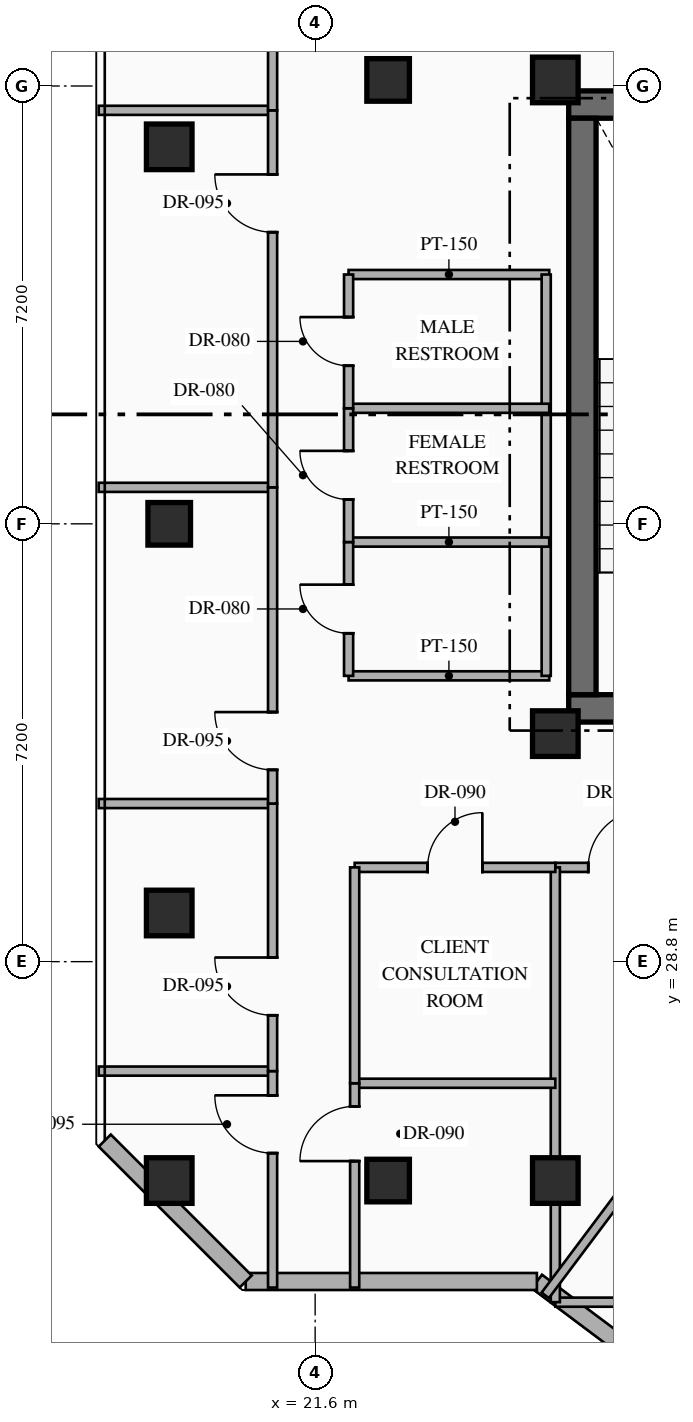
"""IFC4 building model, lengths in metres.
Left out: names, types, materials, properties, quantities, classifications, styles, units other than length and angle.
Written with IfcOpenShell. Run it as: python <this file> out.ifc"""

import sys

from ifc_helpers import new_model, si_unit, direction, frame, frame_2d, origin, origin_2d, place, context, subcontext, project, spatial, rectangle, hollow_rectangle, extrude, element, fill, save


model = new_model("IFC4")
c1 = context("Model", 3, precision=1e-05, world=origin(), true_north=direction((0.0, 1.0)))
c2 = subcontext(c1, "Body", "Model", "MODEL_VIEW")
j1 = project(units=[si_unit("LENGTHUNIT", "METRE"), si_unit("PLANEANGLEUNIT", "RADIAN")], contexts=[c1])
p1 = place(None, origin())
s1 = spatial("IfcSite", under=j1, at=p1, CompositionType="ELEMENT")
p2 = place(p1, origin())
s2 = spatial("IfcBuilding", under=s1, at=p2, CompositionType="ELEMENT")
p3 = place(p2, frame((0.0, 0.0, 195.15)))
s3 = spatial("IfcBuildingStorey", under=s2, at=p3, CompositionType="ELEMENT", Elevation=195.15)
p4 = place(p3, frame((25.77, 32.965, 0.0), z_axis=(0.0, 0.0, 1.0), x_axis=(1.0, 0.0, 0.0)))
e1 = element("IfcWall", 1, at=p4, inside=s3, PredefinedType="SHEAR", context=c2, shape_type="SweptSolid", body=[
    extrude(rectangle(XDim=7.48, YDim=0.45, at=frame_2d((3.74, 0.0))), origin(), (0.0, 0.0, 1.0), 3.6),
])
p5 = place(p4, frame((2.68, 0.0, 0.0)))
e2 = element("IfcOpeningElement", 2, at=p5, cuts=e1, PredefinedType="OPENING", context=c2, shape_type="SweptSolid", body=[
    extrude(rectangle(XDim=1.1, YDim=2.2, at=frame_2d((0.55, 1.1))), frame((0.0, 0.235, 0.0), z_axis=(0.0, -1.0, 0.0), x_axis=(1.0, 0.0, 0.0)), (0.0, 0.0, 1.0), 0.47),
])
p6 = place(p4, frame((5.43, 0.0, 0.0)))
e3 = element("IfcOpeningElement", 3, at=p6, cuts=e1, PredefinedType="OPENING", context=c2, shape_type="SweptSolid", body=[
    extrude(rectangle(XDim=1.1, YDim=2.15, at=frame_2d((0.55, 1.075))), frame((0.0, 0.235, 0.0), z_axis=(0.0, -1.0, 0.0), x_axis=(1.0, 0.0, 0.0)), (0.0, 0.0, 1.0), 0.47),
])
p7 = place(p3, frame((25.77, 42.895, 0.0), z_axis=(0.0, 0.0, 1.0), x_axis=(1.0, 0.0, 0.0)))
e4 = element("IfcWall", 4, at=p7, inside=s3, PredefinedType="SHEAR", context=c2, shape_type="SweptSolid", body=[
    extrude(rectangle(XDim=7.48, YDim=0.45, at=frame_2d((3.74, 0.0))), origin(), (0.0, 0.0, 1.0), 3.6),
])
p8 = place(p3, frame((25.995, 33.19, 0.0), z_axis=(0.0, 0.0, 1.0), x_axis=(0.0, 1.0, 0.0)))
e5 = element("IfcWall", 5, at=p8, inside=s3, PredefinedType="SHEAR", context=c2, shape_type="SweptSolid", body=[
    extrude(rectangle(XDim=9.48, YDim=0.45, at=frame_2d((4.74, 0.0))), origin(), (0.0, 0.0, 1.0), 3.6),
])
for number, where, z_axis, x_axis in (
    (6, (25.55, 32.55, 0.0), (0.0, 0.0, 1.0), (1.0, 0.0, 0.0)),
    (7, (25.55, 43.3, 0.0), (0.0, 0.0, 1.0), (1.0, 0.0, 0.0)),
    (8, (25.55, 25.2, 0.0), (0.0, 0.0, 1.0), (1.0, 0.0, 0.0)),
    (9, (19.2, 25.2, 0.0), (0.0, 0.0, 1.0), (1.0, 0.0, 0.0)),
    (10, (19.2, 29.6, 0.0), (0.0, 0.0, 1.0), (1.0, 0.0, 0.0)),
    (11, (19.2, 42.2, 0.0), (0.0, 0.0, 1.0), (1.0, 0.0, 0.0)),
):
    element("IfcColumn", number, at=place(p3, frame(where, z_axis=z_axis, x_axis=x_axis)), inside=s3, PredefinedType="COLUMN", context=c2, shape_type="SweptSolid", body=[
        extrude(hollow_rectangle(XDim=0.75, YDim=0.75, WallThickness=0.028, at=origin_2d()), origin(), (0.0, 0.0, 1.0), 3.6),
    ])
for number, where, z_axis, x_axis in (
    (12, (22.8, 25.2, 0.0), (0.0, 0.0, 1.0), (1.0, 0.0, 0.0)),
    (13, (22.8, 43.3, 0.0), (0.0, 0.0, 1.0), (1.0, 0.0, 0.0)),
    (14, (19.2, 36.0, 0.0), (0.0, 0.0, 1.0), (1.0, 0.0, 0.0)),
):
    element("IfcColumn", number, at=place(p3, frame(where, z_axis=z_axis, x_axis=x_axis)), inside=s3, PredefinedType="COLUMN", context=c2, shape_type="SweptSolid", body=[
        extrude(hollow_rectangle(XDim=0.7, YDim=0.7, WallThickness=0.028, at=origin_2d()), origin(), (0.0, 0.0, 1.0), 3.6),
    ])
p9 = place(p3, frame((44.918, 8.787, 0.0), z_axis=(0.0, 0.0, 1.0), x_axis=(-0.800004765927, 0.599993645378, 0.0)))
e15 = element("IfcWall", 15, at=p9, inside=s3, PredefinedType="STANDARD", context=c2, shape_type="SweptSolid", body=[
    extrude(rectangle(XDim=24.588, YDim=0.28, at=frame_2d((12.294, 0.0))), origin(), (0.0, 0.0, 1.0), 3.35),
])
p10 = place(p3, frame((25.247, 23.54, 0.0), z_axis=(0.0, 0.0, 1.0), x_axis=(-1.0, 0.0, 0.0)))
e16 = element("IfcWall", 16, at=p10, inside=s3, PredefinedType="STANDARD", context=c2, shape_type="SweptSolid", body=[
    extrude(rectangle(XDim=4.789, YDim=0.28, at=frame_2d((2.395, 0.0))), origin(), (0.0, 0.0, 1.0), 3.35),
])
p11 = place(p3, frame((20.458, 23.54, 0.0), z_axis=(0.0, 0.0, 1.0), x_axis=(-0.707144017911, 0.707069542501, 0.0)))
e17 = element("IfcWall", 17, at=p11, inside=s3, PredefinedType="STANDARD", context=c2, shape_type="SweptSolid", body=[
    extrude(rectangle(XDim=3.278, YDim=0.28, at=frame_2d((1.639, 0.0))), origin(), (0.0, 0.0, 1.0), 3.35),
])
for number, where, z_axis, x_axis in (
    (18, (22.15, 33.5, 0.0), (0.0, 0.0, 1.0), (1.0, 0.0, 0.0)),
    (19, (22.15, 40.1, 0.0), (0.0, 0.0, 1.0), (1.0, 0.0, 0.0)),
):
    element("IfcWall", number, at=place(p3, frame(where, z_axis=z_axis, x_axis=x_axis)), inside=s3, PredefinedType="PARTITIONING", context=c2, shape_type="SweptSolid", body=[
        extrude(rectangle(XDim=3.3, YDim=0.15, at=frame_2d((1.65, 0.0))), origin(), (0.0, 0.0, 1.0), 3.35),
    ])
p12 = place(p3, frame((25.4, 33.5, 0.0), z_axis=(0.0, 0.0, 1.0), x_axis=(0.0, 1.0, 0.0)))
e20 = element("IfcWall", 20, at=p12, inside=s3, PredefinedType="PARTITIONING", context=c2, shape_type="SweptSolid", body=[
    extrude(rectangle(XDim=6.6, YDim=0.15, at=frame_2d((3.3, 0.0))), origin(), (0.0, 0.0, 1.0), 3.35),
])
for number, where, z_axis, x_axis in (
    (21, (22.15, 35.7, 0.0), (0.0, 0.0, 1.0), (1.0, 0.0, 0.0)),
    (22, (22.15, 37.9, 0.0), (0.0, 0.0, 1.0), (1.0, 0.0, 0.0)),
):
    element("IfcWall", number, at=place(p3, frame(where, z_axis=z_axis, x_axis=x_axis)), inside=s3, PredefinedType="PARTITIONING", context=c2, shape_type="SweptSolid", body=[
        extrude(rectangle(XDim=3.3, YDim=0.15, at=frame_2d((1.65, 0.0))), origin(), (0.0, 0.0, 1.0), 3.35),
    ])
p13 = place(p3, frame((22.15, 33.5, 0.0), z_axis=(0.0, 0.0, 1.0), x_axis=(0.0, 1.0, 0.0)))
e23 = element("IfcWall", 23, at=p13, inside=s3, PredefinedType="PARTITIONING", context=c2, shape_type="SweptSolid", body=[
    extrude(rectangle(XDim=2.2, YDim=0.15, at=frame_2d((1.1, 0.0))), origin(), (0.0, 0.0, 1.0), 3.35),
])
p14 = place(p13, frame((0.7, 0.0, 0.0)))
e24 = element("IfcOpeningElement", 24, at=p14, cuts=e23, PredefinedType="OPENING", context=c2, shape_type="SweptSolid", body=[
    extrude(rectangle(XDim=0.8, YDim=2.06, at=frame_2d((0.4, 1.03))), frame((0.0, 0.085, 0.0), z_axis=(0.0, -1.0, 0.0), x_axis=(1.0, 0.0, 0.0)), (0.0, 0.0, 1.0), 0.17),
])
p15 = place(p3, frame((22.15, 35.7, 0.0), z_axis=(0.0, 0.0, 1.0), x_axis=(0.0, 1.0, 0.0)))
e25 = element("IfcWall", 25, at=p15, inside=s3, PredefinedType="PARTITIONING", context=c2, shape_type="SweptSolid", body=[
    extrude(rectangle(XDim=2.2, YDim=0.15, at=frame_2d((1.1, 0.0))), origin(), (0.0, 0.0, 1.0), 3.35),
])
p16 = place(p15, frame((0.7, 0.0, 0.0)))
e26 = element("IfcOpeningElement", 26, at=p16, cuts=e25, PredefinedType="OPENING", context=c2, shape_type="SweptSolid", body=[
    extrude(rectangle(XDim=0.8, YDim=2.06, at=frame_2d((0.4, 1.03))), frame((0.0, 0.085, 0.0), z_axis=(0.0, -1.0, 0.0), x_axis=(1.0, 0.0, 0.0)), (0.0, 0.0, 1.0), 0.17),
])
p17 = place(p3, frame((22.15, 37.9, 0.0), z_axis=(0.0, 0.0, 1.0), x_axis=(0.0, 1.0, 0.0)))
e27 = element("IfcWall", 27, at=p17, inside=s3, PredefinedType="PARTITIONING", context=c2, shape_type="SweptSolid", body=[
    extrude(rectangle(XDim=2.2, YDim=0.15, at=frame_2d((1.1, 0.0))), origin(), (0.0, 0.0, 1.0), 3.35),
])
p18 = place(p17, frame((0.7, 0.0, 0.0)))
e28 = element("IfcOpeningElement", 28, at=p18, cuts=e27, PredefinedType="OPENING", context=c2, shape_type="SweptSolid", body=[
    extrude(rectangle(XDim=0.8, YDim=2.06, at=frame_2d((0.4, 1.03))), frame((0.0, 0.085, 0.0), z_axis=(0.0, -1.0, 0.0), x_axis=(1.0, 0.0, 0.0)), (0.0, 0.0, 1.0), 0.17),
])
p19 = place(p3, frame((25.55, 23.2, 0.0), z_axis=(0.0, 0.0, 1.0), x_axis=(1.0, 0.0, 0.0)))
e29 = element("IfcWall", 29, at=p19, inside=s3, PredefinedType="PARTITIONING", context=c2, shape_type="SweptSolid", body=[
    extrude(rectangle(XDim=4.95, YDim=0.15, at=frame_2d((2.475, 0.0))), origin(), (0.0, 0.0, 1.0), 3.35),
])
p20 = place(p3, frame((25.55, 30.35, 0.0), z_axis=(0.0, 0.0, 1.0), x_axis=(1.0, 0.0, 0.0)))
e30 = element("IfcWall", 30, at=p20, inside=s3, PredefinedType="PARTITIONING", context=c2, shape_type="SweptSolid", body=[
    extrude(rectangle(XDim=4.95, YDim=0.15, at=frame_2d((2.475, 0.0))), origin(), (0.0, 0.0, 1.0), 3.35),
])
p21 = place(p20, frame((0.542, 0.0, 0.0)))
e31 = element("IfcOpeningElement", 31, at=p21, cuts=e30, PredefinedType="OPENING", context=c2, shape_type="SweptSolid", body=[
    extrude(rectangle(XDim=0.95, YDim=2.15, at=frame_2d((0.475, 1.075))), frame((0.0, 0.085, 0.0), z_axis=(0.0, -1.0, 0.0), x_axis=(1.0, 0.0, 0.0)), (0.0, 0.0, 1.0), 0.17),
])
p22 = place(p3, frame((25.55, 23.2, 0.0), z_axis=(0.0, 0.0, 1.0), x_axis=(0.0, 1.0, 0.0)))
e32 = element("IfcWall", 32, at=p22, inside=s3, PredefinedType="PARTITIONING", context=c2, shape_type="SweptSolid", body=[
    extrude(rectangle(XDim=7.15, YDim=0.15, at=frame_2d((3.575, 0.0))), origin(), (0.0, 0.0, 1.0), 2.757),
])
p23 = place(p3, frame((18.04, 27.0, 0.0), z_axis=(0.0, 0.0, 1.0), x_axis=(1.0, 0.0, 0.0)))
e33 = element("IfcWall", 33, at=p23, inside=s3, PredefinedType="PARTITIONING", context=c2, shape_type="SweptSolid", body=[
    extrude(rectangle(XDim=2.86, YDim=0.15, at=frame_2d((1.43, 0.0))), origin(), (0.0, 0.0, 1.0), 3.35),
])
p24 = place(p3, frame((20.9, 23.44, 0.0), z_axis=(0.0, 0.0, 1.0), x_axis=(0.0, 1.0, 0.0)))
e34 = element("IfcWall", 34, at=p24, inside=s3, PredefinedType="PARTITIONING", context=c2, shape_type="SweptSolid", body=[
    extrude(rectangle(XDim=3.56, YDim=0.15, at=frame_2d((1.78, 0.0))), origin(), (0.0, 0.0, 1.0), 3.35),
])
p25 = place(p24, frame((2.211, 0.0, 0.0)))
e35 = element("IfcOpeningElement", 35, at=p25, cuts=e34, PredefinedType="OPENING", context=c2, shape_type="SweptSolid", body=[
    extrude(rectangle(XDim=0.95, YDim=2.15, at=frame_2d((0.475, 1.075))), frame((0.0, 0.085, 0.0), z_axis=(0.0, -1.0, 0.0), x_axis=(1.0, 0.0, 0.0)), (0.0, 0.0, 1.0), 0.17),
])
p26 = place(p3, frame((18.04, 31.4, 0.0), z_axis=(0.0, 0.0, 1.0), x_axis=(1.0, 0.0, 0.0)))
e36 = element("IfcWall", 36, at=p26, inside=s3, PredefinedType="PARTITIONING", context=c2, shape_type="SweptSolid", body=[
    extrude(rectangle(XDim=2.86, YDim=0.15, at=frame_2d((1.43, 0.0))), origin(), (0.0, 0.0, 1.0), 3.35),
])
p27 = place(p3, frame((20.9, 27.0, 0.0), z_axis=(0.0, 0.0, 1.0), x_axis=(0.0, 1.0, 0.0)))
e37 = element("IfcWall", 37, at=p27, inside=s3, PredefinedType="PARTITIONING", context=c2, shape_type="SweptSolid", body=[
    extrude(rectangle(XDim=4.4, YDim=0.15, at=frame_2d((2.2, 0.0))), origin(), (0.0, 0.0, 1.0), 3.35),
])
p28 = place(p27, frame((0.918, 0.0, 0.0)))
e38 = element("IfcOpeningElement", 38, at=p28, cuts=e37, PredefinedType="OPENING", context=c2, shape_type="SweptSolid", body=[
    extrude(rectangle(XDim=0.95, YDim=2.15, at=frame_2d((0.475, 1.075))), frame((0.0, 0.085, 0.0), z_axis=(0.0, -1.0, 0.0), x_axis=(1.0, 0.0, 0.0)), (0.0, 0.0, 1.0), 0.17),
])
p29 = place(p3, frame((18.04, 36.6, 0.0), z_axis=(0.0, 0.0, 1.0), x_axis=(1.0, 0.0, 0.0)))
e39 = element("IfcWall", 39, at=p29, inside=s3, PredefinedType="PARTITIONING", context=c2, shape_type="SweptSolid", body=[
    extrude(rectangle(XDim=2.86, YDim=0.15, at=frame_2d((1.43, 0.0))), origin(), (0.0, 0.0, 1.0), 3.35),
])
p30 = place(p3, frame((20.9, 31.4, 0.0), z_axis=(0.0, 0.0, 1.0), x_axis=(0.0, 1.0, 0.0)))
e40 = element("IfcWall", 40, at=p30, inside=s3, PredefinedType="PARTITIONING", context=c2, shape_type="SweptSolid", body=[
    extrude(rectangle(XDim=5.2, YDim=0.15, at=frame_2d((2.6, 0.0))), origin(), (0.0, 0.0, 1.0), 3.35),
])
p31 = place(p30, frame((0.554, 0.0, 0.0)))
e41 = element("IfcOpeningElement", 41, at=p31, cuts=e40, PredefinedType="OPENING", context=c2, shape_type="SweptSolid", body=[
    extrude(rectangle(XDim=0.95, YDim=2.15, at=frame_2d((0.475, 1.075))), frame((0.0, 0.085, 0.0), z_axis=(0.0, -1.0, 0.0), x_axis=(1.0, 0.0, 0.0)), (0.0, 0.0, 1.0), 0.17),
])
p32 = place(p3, frame((18.04, 42.8, 0.0), z_axis=(0.0, 0.0, 1.0), x_axis=(1.0, 0.0, 0.0)))
e42 = element("IfcWall", 42, at=p32, inside=s3, PredefinedType="PARTITIONING", context=c2, shape_type="SweptSolid", body=[
    extrude(rectangle(XDim=2.86, YDim=0.15, at=frame_2d((1.43, 0.0))), origin(), (0.0, 0.0, 1.0), 3.35),
])
p33 = place(p3, frame((20.9, 36.6, 0.0), z_axis=(0.0, 0.0, 1.0), x_axis=(0.0, 1.0, 0.0)))
e43 = element("IfcWall", 43, at=p33, inside=s3, PredefinedType="PARTITIONING", context=c2, shape_type="SweptSolid", body=[
    extrude(rectangle(XDim=6.2, YDim=0.15, at=frame_2d((3.1, 0.0))), origin(), (0.0, 0.0, 1.0), 3.35),
])
p34 = place(p33, frame((4.196, 0.0, 0.0)))
e44 = element("IfcOpeningElement", 44, at=p34, cuts=e43, PredefinedType="OPENING", context=c2, shape_type="SweptSolid", body=[
    extrude(rectangle(XDim=0.95, YDim=2.15, at=frame_2d((0.475, 1.075))), frame((0.0, 0.085, 0.0), z_axis=(0.0, -1.0, 0.0), x_axis=(1.0, 0.0, 0.0)), (0.0, 0.0, 1.0), 0.17),
])
p35 = place(p3, frame((20.9, 42.8, 0.0), z_axis=(0.0, 0.0, 1.0), x_axis=(0.0, 1.0, 0.0)))
e45 = element("IfcWall", 45, at=p35, inside=s3, PredefinedType="PARTITIONING", context=c2, shape_type="SweptSolid", body=[
    extrude(rectangle(XDim=7.56, YDim=0.15, at=frame_2d((3.78, 0.0))), origin(), (0.0, 0.0, 1.0), 3.35),
])
p36 = place(p35, frame((3.305, 0.0, 0.0)))
e46 = element("IfcOpeningElement", 46, at=p36, cuts=e45, PredefinedType="OPENING", context=c2, shape_type="SweptSolid", body=[
    extrude(rectangle(XDim=0.95, YDim=2.15, at=frame_2d((0.475, 1.075))), frame((0.0, 0.085, 0.0), z_axis=(0.0, -1.0, 0.0), x_axis=(1.0, 0.0, 0.0)), (0.0, 0.0, 1.0), 0.17),
])
p37 = place(p3, frame((22.25, 26.8, 0.0), z_axis=(0.0, 0.0, 1.0), x_axis=(1.0, 0.0, 0.0)))
e47 = element("IfcWall", 47, at=p37, inside=s3, PredefinedType="PARTITIONING", context=c2, shape_type="SweptSolid", body=[
    extrude(rectangle(XDim=3.3, YDim=0.15, at=frame_2d((1.65, 0.0))), origin(), (0.0, 0.0, 1.0), 3.35),
])
p38 = place(p3, frame((22.25, 23.44, 0.0), z_axis=(0.0, 0.0, 1.0), x_axis=(0.0, 1.0, 0.0)))
e48 = element("IfcWall", 48, at=p38, inside=s3, PredefinedType="PARTITIONING", context=c2, shape_type="SweptSolid", body=[
    extrude(rectangle(XDim=3.36, YDim=0.15, at=frame_2d((1.68, 0.0))), origin(), (0.0, 0.0, 1.0), 3.35),
])
p39 = place(p38, frame((2.08, 0.0, 0.0)))
e49 = element("IfcOpeningElement", 49, at=p39, cuts=e48, PredefinedType="OPENING", context=c2, shape_type="SweptSolid", body=[
    extrude(rectangle(XDim=0.9, YDim=2.15, at=frame_2d((0.45, 1.075))), frame((0.0, 0.085, 0.0), z_axis=(0.0, -1.0, 0.0), x_axis=(1.0, 0.0, 0.0)), (0.0, 0.0, 1.0), 0.17),
])
p40 = place(p3, frame((22.25, 30.35, 0.0), z_axis=(0.0, 0.0, 1.0), x_axis=(1.0, 0.0, 0.0)))
e50 = element("IfcWall", 50, at=p40, inside=s3, PredefinedType="PARTITIONING", context=c2, shape_type="SweptSolid", body=[
    extrude(rectangle(XDim=3.3, YDim=0.15, at=frame_2d((1.65, 0.0))), origin(), (0.0, 0.0, 1.0), 3.35),
])
p41 = place(p40, frame((1.2, 0.0, 0.0)))
e51 = element("IfcOpeningElement", 51, at=p41, cuts=e50, PredefinedType="OPENING", context=c2, shape_type="SweptSolid", body=[
    extrude(rectangle(XDim=0.9, YDim=2.15, at=frame_2d((0.45, 1.075))), frame((0.0, 0.085, 0.0), z_axis=(0.0, -1.0, 0.0), x_axis=(1.0, 0.0, 0.0)), (0.0, 0.0, 1.0), 0.17),
])
p42 = place(p3, frame((22.25, 26.8, 0.0), z_axis=(0.0, 0.0, 1.0), x_axis=(0.0, 1.0, 0.0)))
e52 = element("IfcWall", 52, at=p42, inside=s3, PredefinedType="PARTITIONING", context=c2, shape_type="SweptSolid", body=[
    extrude(rectangle(XDim=3.55, YDim=0.15, at=frame_2d((1.775, 0.0))), origin(), (0.0, 0.0, 1.0), 3.35),
])
p43 = place(p3, frame((25.384, 23.312, 0.0), z_axis=(0.0, 0.0, 1.0), x_axis=(0.599990721155, 0.80000695905, 0.0)))
e53 = element("IfcWall", 53, at=p43, inside=s3, PredefinedType="PARTITIONING", context=c2, shape_type="SweptSolid", body=[
    extrude(rectangle(XDim=4.21, YDim=0.15, at=frame_2d((2.105, 0.0))), origin(), (0.0, 0.0, 1.0), 3.35),
])
p44 = place(p14, origin())
e54 = element("IfcDoor", 54, at=p44, inside=s3, OperationType="SINGLE_SWING_RIGHT", PredefinedType="DOOR", context=c2, shape_type="SweptSolid", body=[
    extrude(rectangle(XDim=0.8, YDim=2.06, at=frame_2d((0.4, 1.03))), frame((0.0, 0.025, 0.0), z_axis=(0.0, -1.0, 0.0), x_axis=(1.0, 0.0, 0.0)), (0.0, 0.0, 1.0), 0.05),
])
fill(e24, e54)
p45 = place(p16, origin())
e55 = element("IfcDoor", 55, at=p45, inside=s3, OperationType="SINGLE_SWING_RIGHT", PredefinedType="DOOR", context=c2, shape_type="SweptSolid", body=[
    extrude(rectangle(XDim=0.8, YDim=2.06, at=frame_2d((0.4, 1.03))), frame((0.0, 0.025, 0.0), z_axis=(0.0, -1.0, 0.0), x_axis=(1.0, 0.0, 0.0)), (0.0, 0.0, 1.0), 0.05),
])
fill(e26, e55)
p46 = place(p18, origin())
e56 = element("IfcDoor", 56, at=p46, inside=s3, OperationType="SINGLE_SWING_RIGHT", PredefinedType="DOOR", context=c2, shape_type="SweptSolid", body=[
    extrude(rectangle(XDim=0.8, YDim=2.06, at=frame_2d((0.4, 1.03))), frame((0.0, 0.025, 0.0), z_axis=(0.0, -1.0, 0.0), x_axis=(1.0, 0.0, 0.0)), (0.0, 0.0, 1.0), 0.05),
])
fill(e28, e56)
p47 = place(p21, origin())
e57 = element("IfcDoor", 57, at=p47, inside=s3, OperationType="SINGLE_SWING_RIGHT", PredefinedType="DOOR", context=c2, shape_type="SweptSolid", body=[
    extrude(rectangle(XDim=0.95, YDim=2.15, at=frame_2d((0.475, 1.075))), frame((0.0, 0.025, 0.0), z_axis=(0.0, -1.0, 0.0), x_axis=(1.0, 0.0, 0.0)), (0.0, 0.0, 1.0), 0.05),
])
fill(e31, e57)
p48 = place(p25, origin())
e58 = element("IfcDoor", 58, at=p48, inside=s3, OperationType="SINGLE_SWING_RIGHT", PredefinedType="DOOR", context=c2, shape_type="SweptSolid", body=[
    extrude(rectangle(XDim=0.95, YDim=2.15, at=frame_2d((0.475, 1.075))), frame((0.0, 0.025, 0.0), z_axis=(0.0, -1.0, 0.0), x_axis=(1.0, 0.0, 0.0)), (0.0, 0.0, 1.0), 0.05),
])
fill(e35, e58)
p49 = place(p28, origin())
e59 = element("IfcDoor", 59, at=p49, inside=s3, OperationType="SINGLE_SWING_RIGHT", PredefinedType="DOOR", context=c2, shape_type="SweptSolid", body=[
    extrude(rectangle(XDim=0.95, YDim=2.15, at=frame_2d((0.475, 1.075))), frame((0.0, 0.025, 0.0), z_axis=(0.0, -1.0, 0.0), x_axis=(1.0, 0.0, 0.0)), (0.0, 0.0, 1.0), 0.05),
])
fill(e38, e59)
p50 = place(p31, origin())
e60 = element("IfcDoor", 60, at=p50, inside=s3, OperationType="SINGLE_SWING_RIGHT", PredefinedType="DOOR", context=c2, shape_type="SweptSolid", body=[
    extrude(rectangle(XDim=0.95, YDim=2.15, at=frame_2d((0.475, 1.075))), frame((0.0, 0.025, 0.0), z_axis=(0.0, -1.0, 0.0), x_axis=(1.0, 0.0, 0.0)), (0.0, 0.0, 1.0), 0.05),
])
fill(e41, e60)
p51 = place(p34, origin())
e61 = element("IfcDoor", 61, at=p51, inside=s3, OperationType="SINGLE_SWING_RIGHT", PredefinedType="DOOR", context=c2, shape_type="SweptSolid", body=[
    extrude(rectangle(XDim=0.95, YDim=2.15, at=frame_2d((0.475, 1.075))), frame((0.0, 0.025, 0.0), z_axis=(0.0, -1.0, 0.0), x_axis=(1.0, 0.0, 0.0)), (0.0, 0.0, 1.0), 0.05),
])
fill(e44, e61)
p52 = place(p39, origin())
e62 = element("IfcDoor", 62, at=p52, inside=s3, OperationType="SINGLE_SWING_LEFT", PredefinedType="DOOR", context=c2, shape_type="SweptSolid", body=[
    extrude(rectangle(XDim=0.9, YDim=2.15, at=frame_2d((0.45, 1.075))), frame((0.0, 0.025, 0.0), z_axis=(0.0, -1.0, 0.0), x_axis=(1.0, 0.0, 0.0)), (0.0, 0.0, 1.0), 0.05),
])
fill(e49, e62)
p53 = place(p41, origin())
e63 = element("IfcDoor", 63, at=p53, inside=s3, OperationType="SINGLE_SWING_RIGHT", PredefinedType="DOOR", context=c2, shape_type="SweptSolid", body=[
    extrude(rectangle(XDim=0.9, YDim=2.15, at=frame_2d((0.45, 1.075))), frame((0.0, 0.025, 0.0), z_axis=(0.0, -1.0, 0.0), x_axis=(1.0, 0.0, 0.0)), (0.0, 0.0, 1.0), 0.05),
])
fill(e51, e63)
save(model, sys.argv[1])
